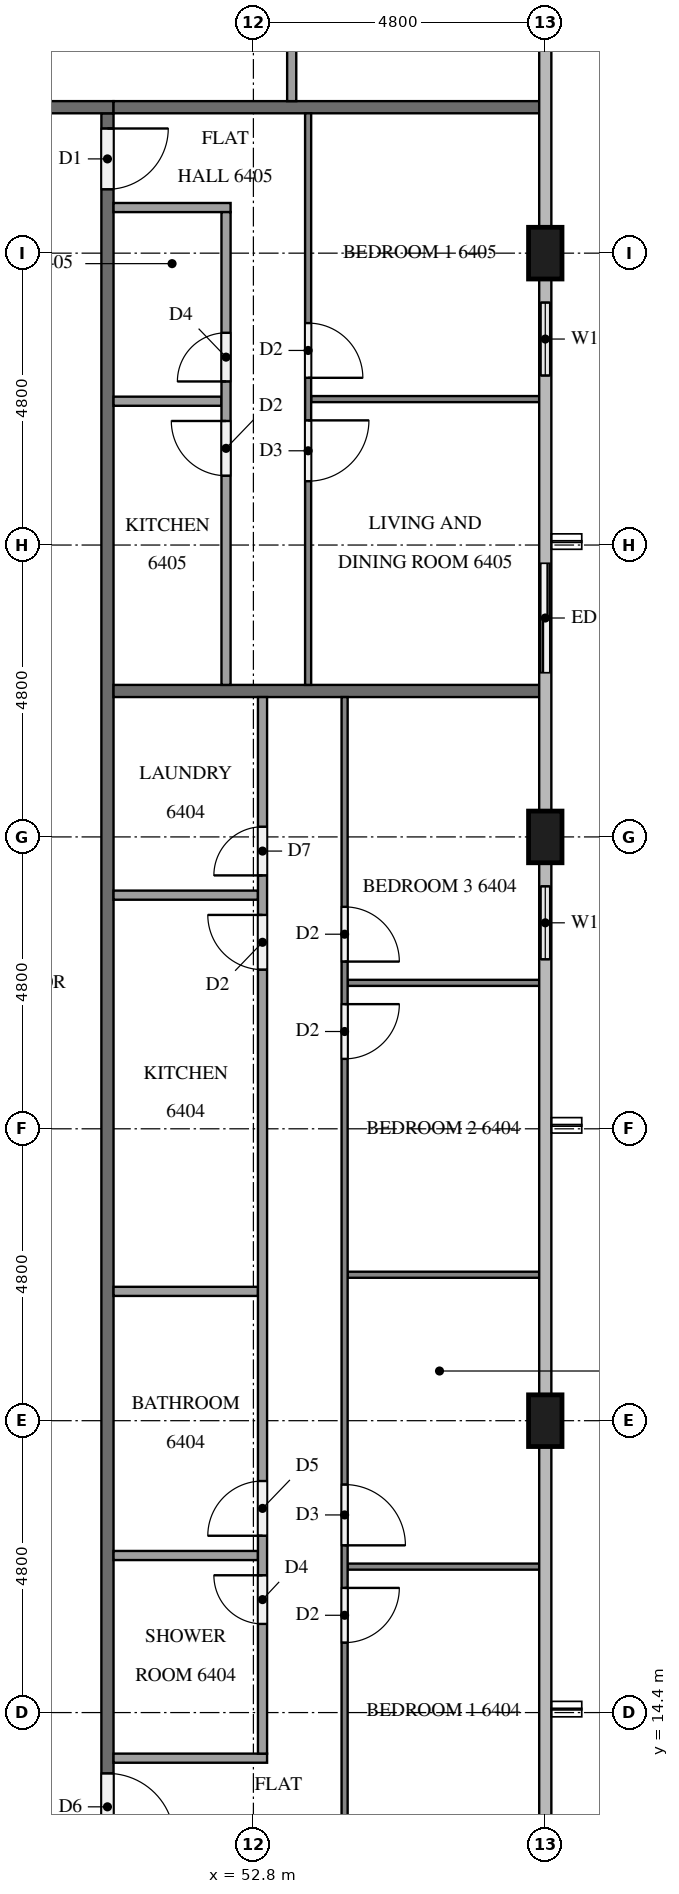
"""IFC4 building model, lengths in metres.
Left out: names, types, materials, properties, quantities, classifications, styles, units other than length and angle.
Written with IfcOpenShell. Run it as: python <this file> out.ifc"""

import sys

from ifc_helpers import new_model, si_unit, direction, frame, frame_2d, origin, origin_2d, place, context, subcontext, project, spatial, rectangle, extrude, element, fill, save


model = new_model("IFC4")
c1 = context("Model", 3, precision=1e-05, world=origin(), true_north=direction((0.0, 1.0)))
c2 = subcontext(c1, "Body", "Model", "MODEL_VIEW")
j1 = project(units=[si_unit("LENGTHUNIT", "METRE"), si_unit("PLANEANGLEUNIT", "RADIAN")], contexts=[c1])
p1 = place(None, origin())
s1 = spatial("IfcSite", under=j1, at=p1, CompositionType="ELEMENT")
p2 = place(p1, origin())
s2 = spatial("IfcBuilding", under=s1, at=p2, CompositionType="ELEMENT")
p3 = place(p2, frame((0.0, 0.0, 245.7)))
s3 = spatial("IfcBuildingStorey", under=s2, at=p3, CompositionType="ELEMENT", Elevation=245.7)
for number, where, z_axis, x_axis in (
    (1, (57.6, 19.2, 0.0), (0.0, 0.0, 1.0), (0.0, 1.0, 0.0)),
    (2, (57.6, 28.8, 0.0), (0.0, 0.0, 1.0), (0.0, 1.0, 0.0)),
    (3, (57.6, 38.4, 0.0), (0.0, 0.0, 1.0), (0.0, 1.0, 0.0)),
):
    element("IfcColumn", number, at=place(p3, frame(where, z_axis=z_axis, x_axis=x_axis)), inside=s3, PredefinedType="COLUMN", context=c2, shape_type="SweptSolid", body=[
        extrude(rectangle(XDim=0.85, YDim=0.55, at=origin_2d()), origin(), (0.0, 0.0, 1.0), 3.2),
    ])
p4 = place(p3, frame((57.6, 26.4, 0.0), z_axis=(0.0, 0.0, 1.0), x_axis=(0.0, 1.0, 0.0)))
e4 = element("IfcWall", 4, at=p4, inside=s3, PredefinedType="SOLIDWALL", context=c2, shape_type="SweptSolid", body=[
    extrude(rectangle(XDim=1.975, YDim=0.15, at=frame_2d((0.988, 0.0))), origin(), (0.0, 0.0, 1.0), 3.2),
])
p5 = place(p4, frame((0.387, 0.0, 0.9)))
e5 = element("IfcOpeningElement", 5, at=p5, cuts=e4, PredefinedType="OPENING", context=c2, shape_type="SweptSolid", body=[
    extrude(rectangle(XDim=1.2, YDim=1.4, at=frame_2d((0.6, 0.7))), frame((0.0, 0.085, 0.0), z_axis=(0.0, -1.0, 0.0), x_axis=(1.0, 0.0, 0.0)), (0.0, 0.0, 1.0), 0.17),
])
p6 = place(p3, frame((57.6, 31.2, 0.0), z_axis=(0.0, 0.0, 1.0), x_axis=(0.0, 1.0, 0.0)))
e6 = element("IfcWall", 6, at=p6, inside=s3, PredefinedType="SOLIDWALL", context=c2, shape_type="SweptSolid", body=[
    extrude(rectangle(XDim=2.4, YDim=0.15, at=frame_2d((1.2, 0.0))), origin(), (0.0, 0.0, 1.0), 3.2),
])
p7 = place(p6, frame((0.3, 0.0, 0.0)))
e7 = element("IfcOpeningElement", 7, at=p7, cuts=e6, PredefinedType="OPENING", context=c2, shape_type="SweptSolid", body=[
    extrude(rectangle(XDim=1.8, YDim=2.4, at=frame_2d((0.9, 1.2))), frame((0.0, 0.085, 0.0), z_axis=(0.0, -1.0, 0.0), x_axis=(1.0, 0.0, 0.0)), (0.0, 0.0, 1.0), 0.17),
])
p8 = place(p3, frame((57.6, 36.0, 0.0), z_axis=(0.0, 0.0, 1.0), x_axis=(0.0, 1.0, 0.0)))
e8 = element("IfcWall", 8, at=p8, inside=s3, PredefinedType="SOLIDWALL", context=c2, shape_type="SweptSolid", body=[
    extrude(rectangle(XDim=1.975, YDim=0.15, at=frame_2d((0.988, 0.0))), origin(), (0.0, 0.0, 1.0), 3.2),
])
p9 = place(p8, frame((0.387, 0.0, 0.9)))
e9 = element("IfcOpeningElement", 9, at=p9, cuts=e8, PredefinedType="OPENING", context=c2, shape_type="SweptSolid", body=[
    extrude(rectangle(XDim=1.2, YDim=1.4, at=frame_2d((0.6, 0.7))), frame((0.0, 0.085, 0.0), z_axis=(0.0, -1.0, 0.0), x_axis=(1.0, 0.0, 0.0)), (0.0, 0.0, 1.0), 0.17),
])
p10 = place(p3, frame((50.4, 40.7, 0.0), z_axis=(0.0, 0.0, 1.0), x_axis=(0.0, -1.0, 0.0)))
e10 = element("IfcWall", 10, at=p10, inside=s3, PredefinedType="PARTITIONING", context=c2, shape_type="SweptSolid", body=[
    extrude(rectangle(XDim=28.6, YDim=0.2, at=frame_2d((14.3, 0.0))), origin(), (0.0, 0.0, 1.0), 3.2),
])
p11 = place(p10, frame((27.3, 0.0, 0.0)))
e11 = element("IfcOpeningElement", 11, at=p11, cuts=e10, PredefinedType="OPENING", context=c2, shape_type="SweptSolid", body=[
    extrude(rectangle(XDim=1.1, YDim=2.1, at=frame_2d((0.55, 1.05))), frame((0.0, 0.11, 0.0), z_axis=(0.0, -1.0, 0.0), x_axis=(1.0, 0.0, 0.0)), (0.0, 0.0, 1.0), 0.22),
])
p12 = place(p10, frame((0.25, 0.0, 0.0)))
e12 = element("IfcOpeningElement", 12, at=p12, cuts=e10, PredefinedType="OPENING", context=c2, shape_type="SweptSolid", body=[
    extrude(rectangle(XDim=1.0, YDim=2.1, at=frame_2d((0.5, 1.05))), frame((0.0, 0.11, 0.0), z_axis=(0.0, -1.0, 0.0), x_axis=(1.0, 0.0, 0.0)), (0.0, 0.0, 1.0), 0.22),
])
p13 = place(p3, frame((11.9, 40.8, 0.0), z_axis=(0.0, 0.0, 1.0), x_axis=(1.0, 0.0, 0.0)))
e13 = element("IfcWall", 13, at=p13, inside=s3, PredefinedType="PARTITIONING", context=c2, shape_type="SweptSolid", body=[
    extrude(rectangle(XDim=38.6, YDim=0.2, at=frame_2d((19.3, 0.0))), origin(), (0.0, 0.0, 1.0), 3.2),
])
p14 = place(p13, frame((34.05, 0.0, 0.0)))
e14 = element("IfcOpeningElement", 14, at=p14, cuts=e13, PredefinedType="OPENING", context=c2, shape_type="SweptSolid", body=[
    extrude(rectangle(XDim=1.0, YDim=2.1, at=frame_2d((0.5, 1.05))), frame((0.0, 0.11, 0.0), z_axis=(0.0, -1.0, 0.0), x_axis=(1.0, 0.0, 0.0)), (0.0, 0.0, 1.0), 0.22),
])
p15 = place(p13, frame((32.3, 0.0, 0.0)))
e15 = element("IfcOpeningElement", 15, at=p15, cuts=e13, PredefinedType="OPENING", context=c2, shape_type="SweptSolid", body=[
    extrude(rectangle(XDim=1.1, YDim=2.1, at=frame_2d((0.55, 1.05))), frame((0.0, 0.11, 0.0), z_axis=(0.0, -1.0, 0.0), x_axis=(1.0, 0.0, 0.0)), (0.0, 0.0, 1.0), 0.22),
])
p16 = place(p13, frame((2.85, 0.0, 0.0)))
e16 = element("IfcOpeningElement", 16, at=p16, cuts=e13, PredefinedType="OPENING", context=c2, shape_type="SweptSolid", body=[
    extrude(rectangle(XDim=1.0, YDim=2.1, at=frame_2d((0.5, 1.05))), frame((0.0, 0.11, 0.0), z_axis=(0.0, -1.0, 0.0), x_axis=(1.0, 0.0, 0.0)), (0.0, 0.0, 1.0), 0.22),
])
p17 = place(p13, frame((1.15, 0.0, 0.0)))
e17 = element("IfcOpeningElement", 17, at=p17, cuts=e13, PredefinedType="OPENING", context=c2, shape_type="SweptSolid", body=[
    extrude(rectangle(XDim=1.0, YDim=2.1, at=frame_2d((0.5, 1.05))), frame((0.0, 0.11, 0.0), z_axis=(0.0, -1.0, 0.0), x_axis=(1.0, 0.0, 0.0)), (0.0, 0.0, 1.0), 0.22),
])
for number, where, z_axis, x_axis in (
    (18, (50.5, 31.2, 0.0), (0.0, 0.0, 1.0), (1.0, 0.0, 0.0)),
    (19, (50.5, 40.8, 0.0), (0.0, 0.0, 1.0), (1.0, 0.0, 0.0)),
):
    element("IfcWall", number, at=place(p3, frame(where, z_axis=z_axis, x_axis=x_axis)), inside=s3, PredefinedType="PARTITIONING", context=c2, shape_type="SweptSolid", body=[
        extrude(rectangle(XDim=7.0, YDim=0.2, at=frame_2d((3.5, 0.0))), origin(), (0.0, 0.0, 1.0), 3.2),
    ])
for number, where, z_axis, x_axis in (
    (20, (54.35, 16.8, 0.0), (0.0, 0.0, 1.0), (1.0, 0.0, 0.0)),
    (21, (54.35, 21.6, 0.0), (0.0, 0.0, 1.0), (1.0, 0.0, 0.0)),
    (22, (54.35, 26.4, 0.0), (0.0, 0.0, 1.0), (1.0, 0.0, 0.0)),
):
    element("IfcWall", number, at=place(p3, frame(where, z_axis=z_axis, x_axis=x_axis)), inside=s3, PredefinedType="PARTITIONING", context=c2, shape_type="SweptSolid", body=[
        extrude(rectangle(XDim=3.15, YDim=0.1, at=frame_2d((1.575, 0.0))), origin(), (0.0, 0.0, 1.0), 3.2),
    ])
p18 = place(p3, frame((54.3, 31.1, 0.0), z_axis=(0.0, 0.0, 1.0), x_axis=(0.0, -1.0, 0.0)))
e23 = element("IfcWall", 23, at=p18, inside=s3, PredefinedType="PARTITIONING", context=c2, shape_type="SweptSolid", body=[
    extrude(rectangle(XDim=19.0, YDim=0.1, at=frame_2d((9.5, 0.0))), origin(), (0.0, 0.0, 1.0), 3.2),
])
p19 = place(p18, frame((14.65, 0.0, 0.0)))
e24 = element("IfcOpeningElement", 24, at=p19, cuts=e23, PredefinedType="OPENING", context=c2, shape_type="SweptSolid", body=[
    extrude(rectangle(XDim=0.9, YDim=2.1, at=frame_2d((0.45, 1.05))), frame((0.0, 0.06, 0.0), z_axis=(0.0, -1.0, 0.0), x_axis=(1.0, 0.0, 0.0)), (0.0, 0.0, 1.0), 0.12),
])
p20 = place(p18, frame((12.95, 0.0, 0.0)))
e25 = element("IfcOpeningElement", 25, at=p20, cuts=e23, PredefinedType="OPENING", context=c2, shape_type="SweptSolid", body=[
    extrude(rectangle(XDim=1.0, YDim=2.1, at=frame_2d((0.5, 1.05))), frame((0.0, 0.06, 0.0), z_axis=(0.0, -1.0, 0.0), x_axis=(1.0, 0.0, 0.0)), (0.0, 0.0, 1.0), 0.12),
])
p21 = place(p18, frame((5.05, 0.0, 0.0)))
e26 = element("IfcOpeningElement", 26, at=p21, cuts=e23, PredefinedType="OPENING", context=c2, shape_type="SweptSolid", body=[
    extrude(rectangle(XDim=0.9, YDim=2.1, at=frame_2d((0.45, 1.05))), frame((0.0, 0.06, 0.0), z_axis=(0.0, -1.0, 0.0), x_axis=(1.0, 0.0, 0.0)), (0.0, 0.0, 1.0), 0.12),
])
p22 = place(p18, frame((3.45, 0.0, 0.0)))
e27 = element("IfcOpeningElement", 27, at=p22, cuts=e23, PredefinedType="OPENING", context=c2, shape_type="SweptSolid", body=[
    extrude(rectangle(XDim=0.9, YDim=2.1, at=frame_2d((0.45, 1.05))), frame((0.0, 0.06, 0.0), z_axis=(0.0, -1.0, 0.0), x_axis=(1.0, 0.0, 0.0)), (0.0, 0.0, 1.0), 0.12),
])
for number, where, z_axis, x_axis in (
    (28, (50.5, 16.983, 0.0), (0.0, 0.0, 1.0), (1.0, 0.0, 0.0)),
    (29, (50.5, 21.327, 0.0), (0.0, 0.0, 1.0), (1.0, 0.0, 0.0)),
    (30, (50.5, 27.842, 0.0), (0.0, 0.0, 1.0), (1.0, 0.0, 0.0)),
):
    element("IfcWall", number, at=place(p3, frame(where, z_axis=z_axis, x_axis=x_axis)), inside=s3, PredefinedType="PARTITIONING", context=c2, shape_type="SweptSolid", body=[
        extrude(rectangle(XDim=2.375, YDim=0.15, at=frame_2d((1.188, 0.0))), origin(), (0.0, 0.0, 1.0), 3.2),
    ])
p23 = place(p3, frame((50.5, 13.65, 0.0), z_axis=(0.0, 0.0, 1.0), x_axis=(1.0, 0.0, 0.0)))
e31 = element("IfcWall", 31, at=p23, inside=s3, PredefinedType="PARTITIONING", context=c2, shape_type="SweptSolid", body=[
    extrude(rectangle(XDim=2.525, YDim=0.15, at=frame_2d((1.262, 0.0))), origin(), (0.0, 0.0, 1.0), 3.2),
])
p24 = place(p3, frame((52.95, 13.725, 0.0), z_axis=(0.0, 0.0, 1.0), x_axis=(0.0, 1.0, 0.0)))
e32 = element("IfcWall", 32, at=p24, inside=s3, PredefinedType="PARTITIONING", context=c2, shape_type="SweptSolid", body=[
    extrude(rectangle(XDim=17.375, YDim=0.15, at=frame_2d((8.688, 0.0))), origin(), (0.0, 0.0, 1.0), 3.2),
])
p25 = place(p24, frame((2.133, 0.0, 0.0)))
e33 = element("IfcOpeningElement", 33, at=p25, cuts=e32, PredefinedType="OPENING", context=c2, shape_type="SweptSolid", body=[
    extrude(rectangle(XDim=0.8, YDim=2.1, at=frame_2d((0.4, 1.05))), frame((0.0, 0.085, 0.0), z_axis=(0.0, -1.0, 0.0), x_axis=(1.0, 0.0, 0.0)), (0.0, 0.0, 1.0), 0.17),
])
p26 = place(p24, frame((3.583, 0.0, 0.0)))
e34 = element("IfcOpeningElement", 34, at=p26, cuts=e32, PredefinedType="OPENING", context=c2, shape_type="SweptSolid", body=[
    extrude(rectangle(XDim=0.9, YDim=2.1, at=frame_2d((0.45, 1.05))), frame((0.0, 0.085, 0.0), z_axis=(0.0, -1.0, 0.0), x_axis=(1.0, 0.0, 0.0)), (0.0, 0.0, 1.0), 0.17),
])
p27 = place(p24, frame((12.892, 0.0, 0.0)))
e35 = element("IfcOpeningElement", 35, at=p27, cuts=e32, PredefinedType="OPENING", context=c2, shape_type="SweptSolid", body=[
    extrude(rectangle(XDim=0.9, YDim=2.1, at=frame_2d((0.45, 1.05))), frame((0.0, 0.085, 0.0), z_axis=(0.0, -1.0, 0.0), x_axis=(1.0, 0.0, 0.0)), (0.0, 0.0, 1.0), 0.17),
])
p28 = place(p24, frame((14.442, 0.0, 0.0)))
e36 = element("IfcOpeningElement", 36, at=p28, cuts=e32, PredefinedType="OPENING", context=c2, shape_type="SweptSolid", body=[
    extrude(rectangle(XDim=0.8, YDim=2.1, at=frame_2d((0.4, 1.05))), frame((0.0, 0.085, 0.0), z_axis=(0.0, -1.0, 0.0), x_axis=(1.0, 0.0, 0.0)), (0.0, 0.0, 1.0), 0.17),
])
p29 = place(p3, frame((53.75, 36.0, 0.0), z_axis=(0.0, 0.0, 1.0), x_axis=(1.0, 0.0, 0.0)))
e37 = element("IfcWall", 37, at=p29, inside=s3, PredefinedType="PARTITIONING", context=c2, shape_type="SweptSolid", body=[
    extrude(rectangle(XDim=3.75, YDim=0.1, at=frame_2d((1.875, 0.0))), origin(), (0.0, 0.0, 1.0), 3.2),
])
p30 = place(p3, frame((53.7, 40.7, 0.0), z_axis=(0.0, 0.0, 1.0), x_axis=(0.0, -1.0, 0.0)))
e38 = element("IfcWall", 38, at=p30, inside=s3, PredefinedType="PARTITIONING", context=c2, shape_type="SweptSolid", body=[
    extrude(rectangle(XDim=9.4, YDim=0.1, at=frame_2d((4.7, 0.0))), origin(), (0.0, 0.0, 1.0), 3.2),
])
p31 = place(p30, frame((3.45, 0.0, 0.0)))
e39 = element("IfcOpeningElement", 39, at=p31, cuts=e38, PredefinedType="OPENING", context=c2, shape_type="SweptSolid", body=[
    extrude(rectangle(XDim=0.9, YDim=2.1, at=frame_2d((0.45, 1.05))), frame((0.0, 0.06, 0.0), z_axis=(0.0, -1.0, 0.0), x_axis=(1.0, 0.0, 0.0)), (0.0, 0.0, 1.0), 0.12),
])
p32 = place(p30, frame((5.05, 0.0, 0.0)))
e40 = element("IfcOpeningElement", 40, at=p32, cuts=e38, PredefinedType="OPENING", context=c2, shape_type="SweptSolid", body=[
    extrude(rectangle(XDim=1.0, YDim=2.1, at=frame_2d((0.5, 1.05))), frame((0.0, 0.06, 0.0), z_axis=(0.0, -1.0, 0.0), x_axis=(1.0, 0.0, 0.0)), (0.0, 0.0, 1.0), 0.12),
])
p33 = place(p3, frame((50.5, 35.965, 0.0), z_axis=(0.0, 0.0, 1.0), x_axis=(1.0, 0.0, 0.0)))
e41 = element("IfcWall", 41, at=p33, inside=s3, PredefinedType="PARTITIONING", context=c2, shape_type="SweptSolid", body=[
    extrude(rectangle(XDim=1.775, YDim=0.15, at=frame_2d((0.887, 0.0))), origin(), (0.0, 0.0, 1.0), 3.2),
])
p34 = place(p3, frame((50.5, 39.15, 0.0), z_axis=(0.0, 0.0, 1.0), x_axis=(1.0, 0.0, 0.0)))
e42 = element("IfcWall", 42, at=p34, inside=s3, PredefinedType="PARTITIONING", context=c2, shape_type="SweptSolid", body=[
    extrude(rectangle(XDim=1.925, YDim=0.15, at=frame_2d((0.962, 0.0))), origin(), (0.0, 0.0, 1.0), 3.2),
])
p35 = place(p3, frame((52.35, 31.3, 0.0), z_axis=(0.0, 0.0, 1.0), x_axis=(0.0, 1.0, 0.0)))
e43 = element("IfcWall", 43, at=p35, inside=s3, PredefinedType="PARTITIONING", context=c2, shape_type="SweptSolid", body=[
    extrude(rectangle(XDim=7.775, YDim=0.15, at=frame_2d((3.887, 0.0))), origin(), (0.0, 0.0, 1.0), 3.2),
])
p36 = place(p35, frame((4.99, 0.0, 0.0)))
e44 = element("IfcOpeningElement", 44, at=p36, cuts=e43, PredefinedType="OPENING", context=c2, shape_type="SweptSolid", body=[
    extrude(rectangle(XDim=0.8, YDim=2.1, at=frame_2d((0.4, 1.05))), frame((0.0, 0.085, 0.0), z_axis=(0.0, -1.0, 0.0), x_axis=(1.0, 0.0, 0.0)), (0.0, 0.0, 1.0), 0.17),
])
p37 = place(p35, frame((3.44, 0.0, 0.0)))
e45 = element("IfcOpeningElement", 45, at=p37, cuts=e43, PredefinedType="OPENING", context=c2, shape_type="SweptSolid", body=[
    extrude(rectangle(XDim=0.9, YDim=2.1, at=frame_2d((0.45, 1.05))), frame((0.0, 0.085, 0.0), z_axis=(0.0, -1.0, 0.0), x_axis=(1.0, 0.0, 0.0)), (0.0, 0.0, 1.0), 0.17),
])
p38 = place(p3, frame((53.43, 40.9, 0.0), z_axis=(0.0, 0.0, 1.0), x_axis=(0.0, 1.0, 0.0)))
e46 = element("IfcWall", 46, at=p38, inside=s3, PredefinedType="PARTITIONING", context=c2, shape_type="SweptSolid", body=[
    extrude(rectangle(XDim=4.175, YDim=0.15, at=frame_2d((2.087, 0.0))), origin(), (0.0, 0.0, 1.0), 3.2),
])
p39 = place(p5, origin())
e47 = element("IfcWindow", 47, at=p39, inside=s3, PartitioningType="SINGLE_PANEL", PredefinedType="WINDOW", context=c2, shape_type="SweptSolid", body=[
    extrude(rectangle(XDim=1.2, YDim=1.4, at=frame_2d((0.6, 0.7))), frame((0.0, 0.03, 0.0), z_axis=(0.0, -1.0, 0.0), x_axis=(1.0, 0.0, 0.0)), (0.0, 0.0, 1.0), 0.06),
])
fill(e5, e47)
p40 = place(p7, origin())
e48 = element("IfcDoor", 48, at=p40, inside=s3, OperationType="SLIDING_TO_LEFT", PredefinedType="DOOR", context=c2, shape_type="SweptSolid", body=[
    extrude(rectangle(XDim=1.8, YDim=2.4, at=frame_2d((0.9, 1.2))), frame((0.0, 0.025, 0.0), z_axis=(0.0, -1.0, 0.0), x_axis=(1.0, 0.0, 0.0)), (0.0, 0.0, 1.0), 0.05),
])
fill(e7, e48)
p41 = place(p9, origin())
e49 = element("IfcWindow", 49, at=p41, inside=s3, PartitioningType="SINGLE_PANEL", PredefinedType="WINDOW", context=c2, shape_type="SweptSolid", body=[
    extrude(rectangle(XDim=1.2, YDim=1.4, at=frame_2d((0.6, 0.7))), frame((0.0, 0.03, 0.0), z_axis=(0.0, -1.0, 0.0), x_axis=(1.0, 0.0, 0.0)), (0.0, 0.0, 1.0), 0.06),
])
fill(e9, e49)
p42 = place(p11, origin())
e50 = element("IfcDoor", 50, at=p42, inside=s3, OperationType="SINGLE_SWING_RIGHT", PredefinedType="DOOR", context=c2, shape_type="SweptSolid", body=[
    extrude(rectangle(XDim=1.1, YDim=2.1, at=frame_2d((0.55, 1.05))), frame((0.0, 0.025, 0.0), z_axis=(0.0, -1.0, 0.0), x_axis=(1.0, 0.0, 0.0)), (0.0, 0.0, 1.0), 0.05),
])
fill(e11, e50)
p43 = place(p12, origin())
e51 = element("IfcDoor", 51, at=p43, inside=s3, OperationType="SINGLE_SWING_LEFT", PredefinedType="DOOR", context=c2, shape_type="SweptSolid", body=[
    extrude(rectangle(XDim=1.0, YDim=2.1, at=frame_2d((0.5, 1.05))), frame((0.0, 0.025, 0.0), z_axis=(0.0, -1.0, 0.0), x_axis=(1.0, 0.0, 0.0)), (0.0, 0.0, 1.0), 0.05),
])
fill(e12, e51)
p44 = place(p19, origin())
e52 = element("IfcDoor", 52, at=p44, inside=s3, OperationType="SINGLE_SWING_LEFT", PredefinedType="DOOR", context=c2, shape_type="SweptSolid", body=[
    extrude(rectangle(XDim=0.9, YDim=2.1, at=frame_2d((0.45, 1.05))), frame((0.0, 0.025, 0.0), z_axis=(0.0, -1.0, 0.0), x_axis=(1.0, 0.0, 0.0)), (0.0, 0.0, 1.0), 0.05),
])
fill(e24, e52)
p45 = place(p20, origin())
e53 = element("IfcDoor", 53, at=p45, inside=s3, OperationType="SINGLE_SWING_RIGHT", PredefinedType="DOOR", context=c2, shape_type="SweptSolid", body=[
    extrude(rectangle(XDim=1.0, YDim=2.1, at=frame_2d((0.5, 1.05))), frame((0.0, 0.025, 0.0), z_axis=(0.0, -1.0, 0.0), x_axis=(1.0, 0.0, 0.0)), (0.0, 0.0, 1.0), 0.05),
])
fill(e25, e53)
p46 = place(p21, origin())
e54 = element("IfcDoor", 54, at=p46, inside=s3, OperationType="SINGLE_SWING_LEFT", PredefinedType="DOOR", context=c2, shape_type="SweptSolid", body=[
    extrude(rectangle(XDim=0.9, YDim=2.1, at=frame_2d((0.45, 1.05))), frame((0.0, 0.025, 0.0), z_axis=(0.0, -1.0, 0.0), x_axis=(1.0, 0.0, 0.0)), (0.0, 0.0, 1.0), 0.05),
])
fill(e26, e54)
p47 = place(p22, origin())
e55 = element("IfcDoor", 55, at=p47, inside=s3, OperationType="SINGLE_SWING_RIGHT", PredefinedType="DOOR", context=c2, shape_type="SweptSolid", body=[
    extrude(rectangle(XDim=0.9, YDim=2.1, at=frame_2d((0.45, 1.05))), frame((0.0, 0.025, 0.0), z_axis=(0.0, -1.0, 0.0), x_axis=(1.0, 0.0, 0.0)), (0.0, 0.0, 1.0), 0.05),
])
fill(e27, e55)
p48 = place(p25, origin())
e56 = element("IfcDoor", 56, at=p48, inside=s3, OperationType="SINGLE_SWING_RIGHT", PredefinedType="DOOR", context=c2, shape_type="SweptSolid", body=[
    extrude(rectangle(XDim=0.8, YDim=2.1, at=frame_2d((0.4, 1.05))), frame((0.0, 0.025, 0.0), z_axis=(0.0, -1.0, 0.0), x_axis=(1.0, 0.0, 0.0)), (0.0, 0.0, 1.0), 0.05),
])
fill(e33, e56)
p49 = place(p26, origin())
e57 = element("IfcDoor", 57, at=p49, inside=s3, OperationType="SINGLE_SWING_LEFT", PredefinedType="DOOR", context=c2, shape_type="SweptSolid", body=[
    extrude(rectangle(XDim=0.9, YDim=2.1, at=frame_2d((0.45, 1.05))), frame((0.0, 0.025, 0.0), z_axis=(0.0, -1.0, 0.0), x_axis=(1.0, 0.0, 0.0)), (0.0, 0.0, 1.0), 0.05),
])
fill(e34, e57)
p50 = place(p27, origin())
e58 = element("IfcDoor", 58, at=p50, inside=s3, OperationType="SINGLE_SWING_RIGHT", PredefinedType="DOOR", context=c2, shape_type="SweptSolid", body=[
    extrude(rectangle(XDim=0.9, YDim=2.1, at=frame_2d((0.45, 1.05))), frame((0.0, 0.025, 0.0), z_axis=(0.0, -1.0, 0.0), x_axis=(1.0, 0.0, 0.0)), (0.0, 0.0, 1.0), 0.05),
])
fill(e35, e58)
p51 = place(p28, origin())
e59 = element("IfcDoor", 59, at=p51, inside=s3, OperationType="SINGLE_SWING_LEFT", PredefinedType="DOOR", context=c2, shape_type="SweptSolid", body=[
    extrude(rectangle(XDim=0.8, YDim=2.1, at=frame_2d((0.4, 1.05))), frame((0.0, 0.025, 0.0), z_axis=(0.0, -1.0, 0.0), x_axis=(1.0, 0.0, 0.0)), (0.0, 0.0, 1.0), 0.05),
])
fill(e36, e59)
p52 = place(p31, origin())
e60 = element("IfcDoor", 60, at=p52, inside=s3, OperationType="SINGLE_SWING_RIGHT", PredefinedType="DOOR", context=c2, shape_type="SweptSolid", body=[
    extrude(rectangle(XDim=0.9, YDim=2.1, at=frame_2d((0.45, 1.05))), frame((0.0, 0.025, 0.0), z_axis=(0.0, -1.0, 0.0), x_axis=(1.0, 0.0, 0.0)), (0.0, 0.0, 1.0), 0.05),
])
fill(e39, e60)
p53 = place(p32, origin())
e61 = element("IfcDoor", 61, at=p53, inside=s3, OperationType="SINGLE_SWING_LEFT", PredefinedType="DOOR", context=c2, shape_type="SweptSolid", body=[
    extrude(rectangle(XDim=1.0, YDim=2.1, at=frame_2d((0.5, 1.05))), frame((0.0, 0.025, 0.0), z_axis=(0.0, -1.0, 0.0), x_axis=(1.0, 0.0, 0.0)), (0.0, 0.0, 1.0), 0.05),
])
fill(e40, e61)
p54 = place(p36, origin())
e62 = element("IfcDoor", 62, at=p54, inside=s3, OperationType="SINGLE_SWING_LEFT", PredefinedType="DOOR", context=c2, shape_type="SweptSolid", body=[
    extrude(rectangle(XDim=0.8, YDim=2.1, at=frame_2d((0.4, 1.05))), frame((0.0, 0.025, 0.0), z_axis=(0.0, -1.0, 0.0), x_axis=(1.0, 0.0, 0.0)), (0.0, 0.0, 1.0), 0.05),
])
fill(e44, e62)
p55 = place(p37, origin())
e63 = element("IfcDoor", 63, at=p55, inside=s3, OperationType="SINGLE_SWING_RIGHT", PredefinedType="DOOR", context=c2, shape_type="SweptSolid", body=[
    extrude(rectangle(XDim=0.9, YDim=2.1, at=frame_2d((0.45, 1.05))), frame((0.0, 0.025, 0.0), z_axis=(0.0, -1.0, 0.0), x_axis=(1.0, 0.0, 0.0)), (0.0, 0.0, 1.0), 0.05),
])
fill(e45, e63)
save(model, sys.argv[1])
